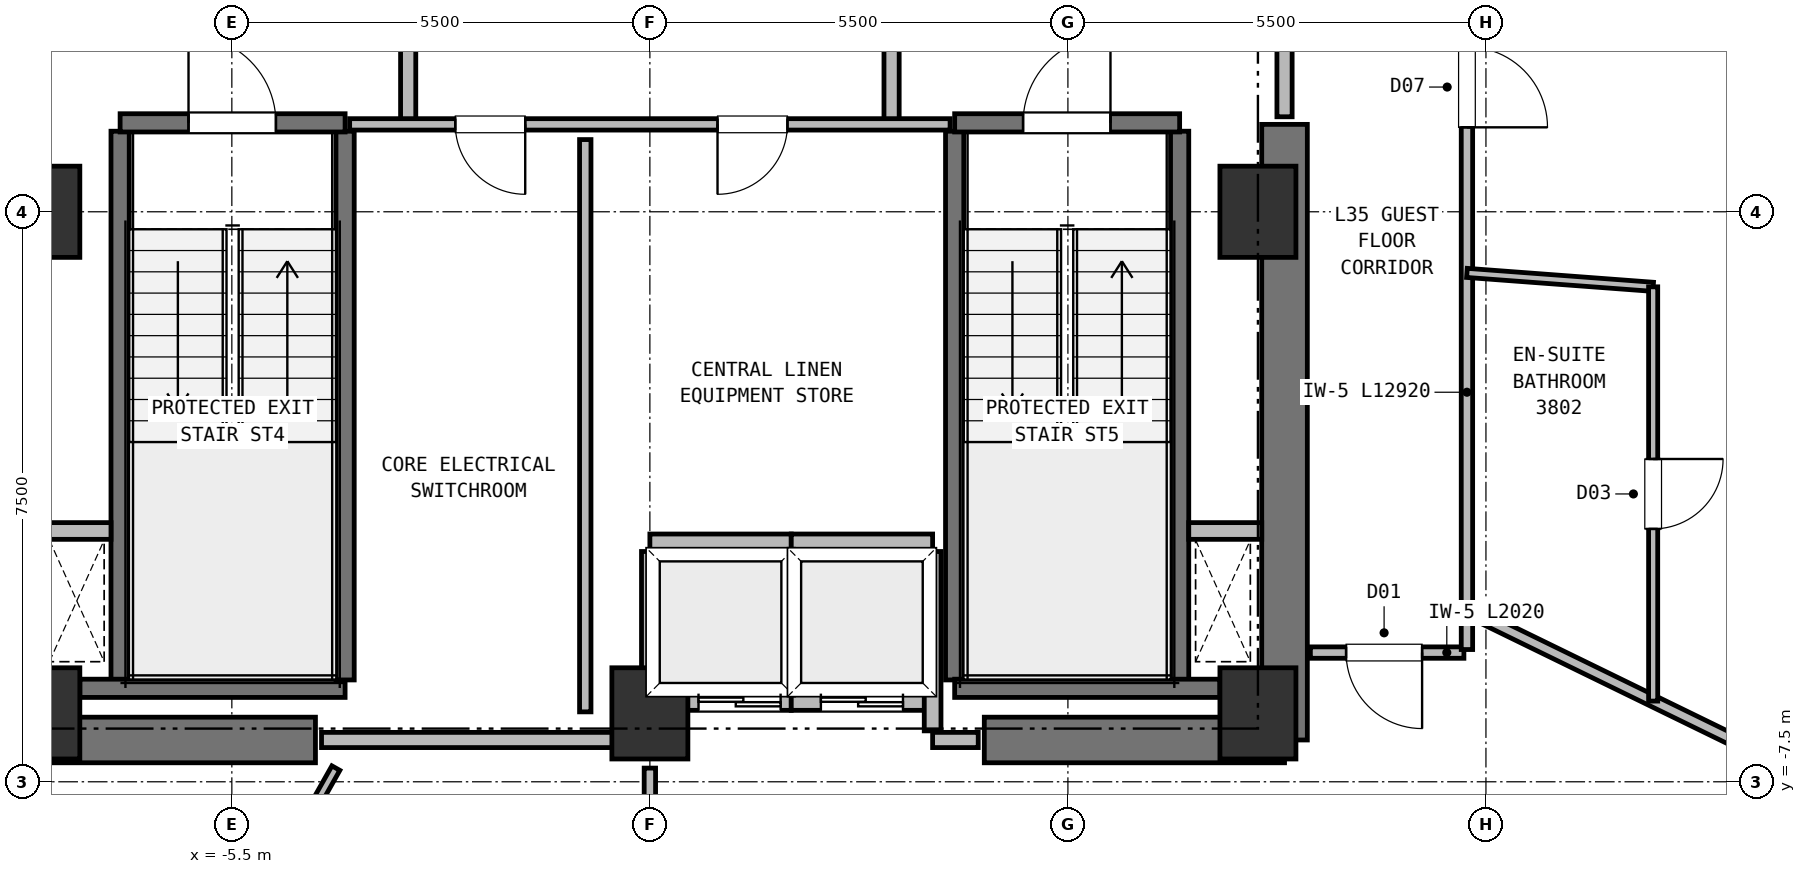
"""IFC4 building model, lengths in metres.
Left out: names, types, materials, properties, quantities, classifications, styles, units other than length and angle.
Written with IfcOpenShell. Run it as: python <this file> out.ifc"""

import sys

from ifc_helpers import new_model, si_unit, direction, frame, frame_2d, origin, origin_2d, place, context, subcontext, project, spatial, rectangle, extrude, element, fill, save


model = new_model("IFC4")
c1 = context("Model", 3, precision=1e-05, world=origin(), true_north=direction((0.0, 1.0)))
c2 = subcontext(c1, "Body", "Model", "MODEL_VIEW")
j1 = project(units=[si_unit("LENGTHUNIT", "METRE"), si_unit("PLANEANGLEUNIT", "RADIAN")], contexts=[c1])
p1 = place(None, origin())
s1 = spatial("IfcSite", under=j1, at=p1, CompositionType="ELEMENT")
p2 = place(p1, origin())
s2 = spatial("IfcBuilding", under=s1, at=p2, CompositionType="ELEMENT")
p3 = place(p2, frame((0.0, 0.0, 142.25)))
s3 = spatial("IfcBuildingStorey", under=s2, at=p3, CompositionType="ELEMENT", Elevation=142.25)
for number, where, z_axis, x_axis in (
    (1, (-8.0, -6.6, 0.0), (0.0, 0.0, 1.0), (1.0, 0.0, 0.0)),
    (2, (0.0, -6.6, 0.0), (0.0, 0.0, 1.0), (1.0, 0.0, 0.0)),
    (3, (8.0, -6.6, 0.0), (0.0, 0.0, 1.0), (1.0, 0.0, 0.0)),
    (4, (8.0, 0.0, 0.0), (0.0, 0.0, 1.0), (1.0, 0.0, 0.0)),
    (5, (-8.0, 0.0, 0.0), (0.0, 0.0, 1.0), (1.0, 0.0, 0.0)),
):
    element("IfcColumn", number, at=place(p3, frame(where, z_axis=z_axis, x_axis=x_axis)), inside=s3, PredefinedType="COLUMN", context=c2, shape_type="SweptSolid", body=[
        extrude(rectangle(XDim=1.0, YDim=1.2, at=origin_2d()), origin(), (0.0, 0.0, 1.0), 3.75),
    ])
for number, where, z_axis, x_axis in (
    (6, (-8.35, -6.95, 0.0), (0.0, 0.0, 1.0), (1.0, 0.0, 0.0)),
    (7, (4.4, -6.95, 0.0), (0.0, 0.0, 1.0), (1.0, 0.0, 0.0)),
):
    element("IfcWall", number, at=place(p3, frame(where, z_axis=z_axis, x_axis=x_axis)), inside=s3, PredefinedType="SHEAR", context=c2, shape_type="SweptSolid", body=[
        extrude(rectangle(XDim=3.95, YDim=0.6, at=frame_2d((1.975, 0.0))), origin(), (0.0, 0.0, 1.0), 3.5),
    ])
p4 = place(p3, frame((8.35, -6.95, 0.0), z_axis=(0.0, 0.0, 1.0), x_axis=(0.0, 1.0, 0.0)))
e8 = element("IfcWall", 8, at=p4, inside=s3, PredefinedType="SHEAR", context=c2, shape_type="SweptSolid", body=[
    extrude(rectangle(XDim=8.1, YDim=0.6, at=frame_2d((4.05, 0.0))), origin(), (0.0, 0.0, 1.0), 3.5),
])
p5 = place(p3, frame((14.747, -8.007, 0.0), z_axis=(0.0, 0.0, 1.0), x_axis=(0.852640164354, 0.522498564716, 0.0)))
e9 = element("IfcColumn", 9, at=p5, inside=s3, PredefinedType="COLUMN", context=c2, shape_type="SweptSolid", body=[
    extrude(rectangle(XDim=0.9, YDim=1.1, at=origin_2d()), origin(), (0.0, 0.0, 1.0), 3.75),
])
p6 = place(p3, frame((18.196, -6.407, 0.0), z_axis=(0.0, 0.0, 1.0), x_axis=(-0.727867791097, -0.685717491889, 0.0)))
e10 = element("IfcWall", 10, at=p6, inside=s3, PredefinedType="SOLIDWALL", context=c2, shape_type="SweptSolid", body=[
    extrude(rectangle(XDim=5.827, YDim=0.36, at=frame_2d((2.914, 0.0))), origin(), (0.0, 0.0, 1.0), 3.5),
])
p7 = place(p6, frame((2.66, 0.0, 0.72)))
e11 = element("IfcOpeningElement", 11, at=p7, cuts=e10, PredefinedType="OPENING", context=c2, shape_type="SweptSolid", body=[
    extrude(rectangle(XDim=1.6, YDim=1.88, at=frame_2d((0.8, 0.94))), frame((0.0, 0.19, 0.0), z_axis=(0.0, -1.0, 0.0), x_axis=(1.0, 0.0, 0.0)), (0.0, 0.0, 1.0), 0.38),
])
p8 = place(p3, frame((-6.97, -6.16, 0.0), z_axis=(0.0, 0.0, 1.0), x_axis=(0.0, 1.0, 0.0)))
e12 = element("IfcWall", 12, at=p8, inside=s3, PredefinedType="SHEAR", context=c2, shape_type="SweptSolid", body=[
    extrude(rectangle(XDim=7.22, YDim=0.24, at=frame_2d((3.61, 0.0))), origin(), (0.0, 0.0, 1.0), 3.5),
])
p9 = place(p3, frame((-7.5, -6.27, 0.0), z_axis=(0.0, 0.0, 1.0), x_axis=(1.0, 0.0, 0.0)))
e13 = element("IfcWall", 13, at=p9, inside=s3, PredefinedType="SHEAR", context=c2, shape_type="SweptSolid", body=[
    extrude(rectangle(XDim=3.49, YDim=0.24, at=frame_2d((1.745, 0.0))), origin(), (0.0, 0.0, 1.0), 3.5),
])
p10 = place(p3, frame((-4.01, -6.16, 0.0), z_axis=(0.0, 0.0, 1.0), x_axis=(0.0, 1.0, 0.0)))
e14 = element("IfcWall", 14, at=p10, inside=s3, PredefinedType="SHEAR", context=c2, shape_type="SweptSolid", body=[
    extrude(rectangle(XDim=7.22, YDim=0.24, at=frame_2d((3.61, 0.0))), origin(), (0.0, 0.0, 1.0), 3.5),
])
p11 = place(p3, frame((-6.97, 1.17, 0.0), z_axis=(0.0, 0.0, 1.0), x_axis=(1.0, 0.0, 0.0)))
e15 = element("IfcWall", 15, at=p11, inside=s3, PredefinedType="SHEAR", context=c2, shape_type="SweptSolid", body=[
    extrude(rectangle(XDim=2.96, YDim=0.24, at=frame_2d((1.48, 0.0))), origin(), (0.0, 0.0, 1.0), 3.5),
])
p12 = place(p11, frame((0.9, 0.0, 0.0)))
e16 = element("IfcOpeningElement", 16, at=p12, cuts=e15, PredefinedType="OPENING", context=c2, shape_type="SweptSolid", body=[
    extrude(rectangle(XDim=1.15, YDim=2.15, at=frame_2d((0.575, 1.075))), frame((0.0, 0.13, 0.0), z_axis=(0.0, -1.0, 0.0), x_axis=(1.0, 0.0, 0.0)), (0.0, 0.0, 1.0), 0.26),
])
for number, where, z_axis, x_axis in (
    (17, (4.01, -6.16, 0.0), (0.0, 0.0, 1.0), (0.0, 1.0, 0.0)),
    (18, (6.97, -6.16, 0.0), (0.0, 0.0, 1.0), (0.0, 1.0, 0.0)),
):
    element("IfcWall", number, at=place(p3, frame(where, z_axis=z_axis, x_axis=x_axis)), inside=s3, PredefinedType="SHEAR", context=c2, shape_type="SweptSolid", body=[
        extrude(rectangle(XDim=7.22, YDim=0.24, at=frame_2d((3.61, 0.0))), origin(), (0.0, 0.0, 1.0), 3.5),
    ])
p13 = place(p3, frame((4.01, -6.27, 0.0), z_axis=(0.0, 0.0, 1.0), x_axis=(1.0, 0.0, 0.0)))
e19 = element("IfcWall", 19, at=p13, inside=s3, PredefinedType="SHEAR", context=c2, shape_type="SweptSolid", body=[
    extrude(rectangle(XDim=3.49, YDim=0.24, at=frame_2d((1.745, 0.0))), origin(), (0.0, 0.0, 1.0), 3.5),
])
p14 = place(p3, frame((4.01, 1.17, 0.0), z_axis=(0.0, 0.0, 1.0), x_axis=(1.0, 0.0, 0.0)))
e20 = element("IfcWall", 20, at=p14, inside=s3, PredefinedType="SHEAR", context=c2, shape_type="SweptSolid", body=[
    extrude(rectangle(XDim=2.96, YDim=0.24, at=frame_2d((1.48, 0.0))), origin(), (0.0, 0.0, 1.0), 3.5),
])
p15 = place(p14, frame((0.9, 0.0, 0.0)))
e21 = element("IfcOpeningElement", 21, at=p15, cuts=e20, PredefinedType="OPENING", context=c2, shape_type="SweptSolid", body=[
    extrude(rectangle(XDim=1.15, YDim=2.15, at=frame_2d((0.575, 1.075))), frame((0.0, 0.13, 0.0), z_axis=(0.0, -1.0, 0.0), x_axis=(1.0, 0.0, 0.0)), (0.0, 0.0, 1.0), 0.26),
])
for number, where, z_axis, x_axis in (
    (22, (-8.05, -4.2, 0.0), (0.0, 0.0, 1.0), (1.0, 0.0, 0.0)),
    (23, (7.09, -4.2, 0.0), (0.0, 0.0, 1.0), (1.0, 0.0, 0.0)),
):
    element("IfcWall", number, at=place(p3, frame(where, z_axis=z_axis, x_axis=x_axis)), inside=s3, PredefinedType="PARTITIONING", context=c2, shape_type="SweptSolid", body=[
        extrude(rectangle(XDim=0.96, YDim=0.22, at=frame_2d((0.48, 0.0))), origin(), (0.0, 0.0, 1.0), 3.5),
    ])
p16 = place(p3, frame((0.0, -6.45, 0.0), z_axis=(0.0, 0.0, 1.0), x_axis=(1.0, 0.0, 0.0)))
e24 = element("IfcWall", 24, at=p16, inside=s3, PredefinedType="PARTITIONING", context=c2, shape_type="SweptSolid", body=[
    extrude(rectangle(XDim=1.86, YDim=0.22, at=frame_2d((0.93, 0.0))), origin(), (0.0, 0.0, 1.0), 3.12),
])
p17 = place(p16, frame((0.64, 0.0, 0.0)))
e25 = element("IfcOpeningElement", 25, at=p17, cuts=e24, PredefinedType="OPENING", context=c2, shape_type="SweptSolid", body=[
    extrude(rectangle(XDim=1.08, YDim=2.15, at=frame_2d((0.54, 1.075))), frame((0.0, 0.12, 0.0), z_axis=(0.0, -1.0, 0.0), x_axis=(1.0, 0.0, 0.0)), (0.0, 0.0, 1.0), 0.24),
])
for number, where, z_axis, x_axis in (
    (26, (0.0, -4.35, 0.0), (0.0, 0.0, 1.0), (1.0, 0.0, 0.0)),
    (27, (0.0, -6.33, 0.0), (0.0, 0.0, 1.0), (0.0, 1.0, 0.0)),
    (28, (1.86, -6.33, 0.0), (0.0, 0.0, 1.0), (0.0, 1.0, 0.0)),
):
    element("IfcWall", number, at=place(p3, frame(where, z_axis=z_axis, x_axis=x_axis)), inside=s3, PredefinedType="PARTITIONING", context=c2, shape_type="SweptSolid", body=[
        extrude(rectangle(XDim=1.86, YDim=0.22, at=frame_2d((0.93, 0.0))), origin(), (0.0, 0.0, 1.0), 3.5),
    ])
p18 = place(p3, frame((1.86, -6.45, 0.0), z_axis=(0.0, 0.0, 1.0), x_axis=(1.0, 0.0, 0.0)))
e29 = element("IfcWall", 29, at=p18, inside=s3, PredefinedType="PARTITIONING", context=c2, shape_type="SweptSolid", body=[
    extrude(rectangle(XDim=1.86, YDim=0.22, at=frame_2d((0.93, 0.0))), origin(), (0.0, 0.0, 1.0), 3.12),
])
p19 = place(p18, frame((0.39, 0.0, 0.0)))
e30 = element("IfcOpeningElement", 30, at=p19, cuts=e29, PredefinedType="OPENING", context=c2, shape_type="SweptSolid", body=[
    extrude(rectangle(XDim=1.08, YDim=2.15, at=frame_2d((0.54, 1.075))), frame((0.0, 0.12, 0.0), z_axis=(0.0, -1.0, 0.0), x_axis=(1.0, 0.0, 0.0)), (0.0, 0.0, 1.0), 0.24),
])
p20 = place(p3, frame((1.86, -4.35, 0.0), z_axis=(0.0, 0.0, 1.0), x_axis=(1.0, 0.0, 0.0)))
e31 = element("IfcWall", 31, at=p20, inside=s3, PredefinedType="PARTITIONING", context=c2, shape_type="SweptSolid", body=[
    extrude(rectangle(XDim=1.86, YDim=0.22, at=frame_2d((0.93, 0.0))), origin(), (0.0, 0.0, 1.0), 3.5),
])
p21 = place(p3, frame((3.72, -6.83, 0.0), z_axis=(0.0, 0.0, 1.0), x_axis=(0.0, 1.0, 0.0)))
e32 = element("IfcWall", 32, at=p21, inside=s3, PredefinedType="PARTITIONING", context=c2, shape_type="SweptSolid", body=[
    extrude(rectangle(XDim=2.36, YDim=0.22, at=frame_2d((1.18, 0.0))), origin(), (0.0, 0.0, 1.0), 3.5),
])
p22 = place(p3, frame((-3.18, 1.15, 0.0), z_axis=(0.0, 0.0, 1.0), x_axis=(0.0, 1.0, 0.0)))
e33 = element("IfcWall", 33, at=p22, inside=s3, PredefinedType="PARTITIONING", context=c2, shape_type="SweptSolid", body=[
    extrude(rectangle(XDim=3.3, YDim=0.2, at=frame_2d((1.65, 0.0))), origin(), (0.0, 0.0, 1.0), 3.5),
])
p23 = place(p22, frame((1.08, 0.0, 0.0)))
e34 = element("IfcOpeningElement", 34, at=p23, cuts=e33, PredefinedType="OPENING", context=c2, shape_type="SweptSolid", body=[
    extrude(rectangle(XDim=1.15, YDim=2.15, at=frame_2d((0.575, 1.075))), frame((0.0, 0.11, 0.0), z_axis=(0.0, -1.0, 0.0), x_axis=(1.0, 0.0, 0.0)), (0.0, 0.0, 1.0), 0.22),
])
p24 = place(p3, frame((3.18, 1.15, 0.0), z_axis=(0.0, 0.0, 1.0), x_axis=(0.0, 1.0, 0.0)))
e35 = element("IfcWall", 35, at=p24, inside=s3, PredefinedType="PARTITIONING", context=c2, shape_type="SweptSolid", body=[
    extrude(rectangle(XDim=3.3, YDim=0.2, at=frame_2d((1.65, 0.0))), origin(), (0.0, 0.0, 1.0), 3.5),
])
p25 = place(p24, frame((1.08, 0.0, 0.0)))
e36 = element("IfcOpeningElement", 36, at=p25, cuts=e35, PredefinedType="OPENING", context=c2, shape_type="SweptSolid", body=[
    extrude(rectangle(XDim=1.15, YDim=2.15, at=frame_2d((0.575, 1.075))), frame((0.0, 0.11, 0.0), z_axis=(0.0, -1.0, 0.0), x_axis=(1.0, 0.0, 0.0)), (0.0, 0.0, 1.0), 0.22),
])
p26 = place(p3, frame((8.35, 1.25, 0.0), z_axis=(0.0, 0.0, 1.0), x_axis=(0.0, 1.0, 0.0)))
e37 = element("IfcWall", 37, at=p26, inside=s3, PredefinedType="PARTITIONING", context=c2, shape_type="SweptSolid", body=[
    extrude(rectangle(XDim=5.3, YDim=0.2, at=frame_2d((2.65, 0.0))), origin(), (0.0, 0.0, 1.0), 3.5),
])
p27 = place(p26, frame((0.95, 0.0, 0.0)))
e38 = element("IfcOpeningElement", 38, at=p27, cuts=e37, PredefinedType="OPENING", context=c2, shape_type="SweptSolid", body=[
    extrude(rectangle(XDim=1.15, YDim=2.15, at=frame_2d((0.575, 1.075))), frame((0.0, 0.11, 0.0), z_axis=(0.0, -1.0, 0.0), x_axis=(1.0, 0.0, 0.0)), (0.0, 0.0, 1.0), 0.22),
])
p28 = place(p3, frame((3.95, 1.15, 0.0), z_axis=(0.0, 0.0, 1.0), x_axis=(-1.0, 0.0, 0.0)))
e39 = element("IfcWall", 39, at=p28, inside=s3, PredefinedType="PARTITIONING", context=c2, shape_type="SweptSolid", body=[
    extrude(rectangle(XDim=7.9, YDim=0.15, at=frame_2d((3.95, 0.0))), origin(), (0.0, 0.0, 1.0), 3.5),
])
p29 = place(p28, frame((5.59, 0.0, 0.0)))
e40 = element("IfcOpeningElement", 40, at=p29, cuts=e39, PredefinedType="OPENING", context=c2, shape_type="SweptSolid", body=[
    extrude(rectangle(XDim=0.92, YDim=2.05, at=frame_2d((0.46, 1.025))), frame((0.0, 0.085, 0.0), z_axis=(0.0, -1.0, 0.0), x_axis=(1.0, 0.0, 0.0)), (0.0, 0.0, 1.0), 0.17),
])
p30 = place(p28, frame((2.14, 0.0, 0.0)))
e41 = element("IfcOpeningElement", 41, at=p30, cuts=e39, PredefinedType="OPENING", context=c2, shape_type="SweptSolid", body=[
    extrude(rectangle(XDim=0.92, YDim=2.05, at=frame_2d((0.46, 1.025))), frame((0.0, 0.085, 0.0), z_axis=(0.0, -1.0, 0.0), x_axis=(1.0, 0.0, 0.0)), (0.0, 0.0, 1.0), 0.17),
])
p31 = place(p3, frame((-4.32, -6.95, 0.0), z_axis=(0.0, 0.0, 1.0), x_axis=(1.0, 0.0, 0.0)))
e42 = element("IfcWall", 42, at=p31, inside=s3, PredefinedType="PARTITIONING", context=c2, shape_type="SweptSolid", body=[
    extrude(rectangle(XDim=4.32, YDim=0.2, at=frame_2d((2.16, 0.0))), origin(), (0.0, 0.0, 1.0), 3.5),
])
p32 = place(p3, frame((3.72, -6.95, 0.0), z_axis=(0.0, 0.0, 1.0), x_axis=(1.0, 0.0, 0.0)))
e43 = element("IfcWall", 43, at=p32, inside=s3, PredefinedType="PARTITIONING", context=c2, shape_type="SweptSolid", body=[
    extrude(rectangle(XDim=0.6, YDim=0.2, at=frame_2d((0.3, 0.0))), origin(), (0.0, 0.0, 1.0), 3.5),
])
p33 = place(p3, frame((-0.85, -6.58, 0.0), z_axis=(0.0, 0.0, 1.0), x_axis=(0.0, 1.0, 0.0)))
e44 = element("IfcWall", 44, at=p33, inside=s3, PredefinedType="PARTITIONING", context=c2, shape_type="SweptSolid", body=[
    extrude(rectangle(XDim=7.53, YDim=0.15, at=frame_2d((3.765, 0.0))), origin(), (0.0, 0.0, 1.0), 3.5),
])
p34 = place(p3, frame((10.71, -5.8, 0.0), z_axis=(0.0, 0.0, 1.0), x_axis=(-1.0, 0.0, 0.0)))
e45 = element("IfcWall", 45, at=p34, inside=s3, PredefinedType="PARTITIONING", context=c2, shape_type="SweptSolid", body=[
    extrude(rectangle(XDim=2.02, YDim=0.15, at=frame_2d((1.01, 0.0))), origin(), (0.0, 0.0, 1.0), 3.5),
])
p35 = place(p34, frame((0.55, 0.0, 0.0)))
e46 = element("IfcOpeningElement", 46, at=p35, cuts=e45, PredefinedType="OPENING", context=c2, shape_type="SweptSolid", body=[
    extrude(rectangle(XDim=1.0, YDim=2.15, at=frame_2d((0.5, 1.075))), frame((0.0, 0.085, 0.0), z_axis=(0.0, -1.0, 0.0), x_axis=(1.0, 0.0, 0.0)), (0.0, 0.0, 1.0), 0.17),
])
p36 = place(p3, frame((10.75, 7.16, 0.0), z_axis=(0.0, 0.0, 1.0), x_axis=(0.0, -1.0, 0.0)))
e47 = element("IfcWall", 47, at=p36, inside=s3, PredefinedType="PARTITIONING", context=c2, shape_type="SweptSolid", body=[
    extrude(rectangle(XDim=12.92, YDim=0.15, at=frame_2d((6.46, 0.0))), origin(), (0.0, 0.0, 1.0), 3.5),
])
p37 = place(p36, frame((1.133, 0.0, 0.0)))
e48 = element("IfcOpeningElement", 48, at=p37, cuts=e47, PredefinedType="OPENING", context=c2, shape_type="SweptSolid", body=[
    extrude(rectangle(XDim=1.0, YDim=2.15, at=frame_2d((0.5, 1.075))), frame((0.0, 0.085, 0.0), z_axis=(0.0, -1.0, 0.0), x_axis=(1.0, 0.0, 0.0)), (0.0, 0.0, 1.0), 0.17),
])
p38 = place(p36, frame((4.989, 0.0, 0.0)))
e49 = element("IfcOpeningElement", 49, at=p38, cuts=e47, PredefinedType="OPENING", context=c2, shape_type="SweptSolid", body=[
    extrude(rectangle(XDim=1.06, YDim=2.15, at=frame_2d((0.53, 1.075))), frame((0.0, 0.085, 0.0), z_axis=(0.0, -1.0, 0.0), x_axis=(1.0, 0.0, 0.0)), (0.0, 0.0, 1.0), 0.17),
])
p39 = place(p3, frame((-4.131, -7.32, 0.0), z_axis=(0.0, 0.0, 1.0), x_axis=(-0.491533175525, -0.870858850422, 0.0)))
e50 = element("IfcWall", 50, at=p39, inside=s3, PredefinedType="PARTITIONING", context=c2, shape_type="SweptSolid", body=[
    extrude(rectangle(XDim=2.733, YDim=0.12, at=frame_2d((1.366, 0.0))), origin(), (0.0, 0.0, 1.0), 3.5),
])
p40 = place(p3, frame((0.0, -7.32, 0.0), z_axis=(0.0, 0.0, 1.0), x_axis=(0.0, -1.0, 0.0)))
e51 = element("IfcWall", 51, at=p40, inside=s3, PredefinedType="PARTITIONING", context=c2, shape_type="SweptSolid", body=[
    extrude(rectangle(XDim=12.184, YDim=0.15, at=frame_2d((6.092, 0.0))), origin(), (0.0, 0.0, 1.0), 3.5),
])
p41 = place(p3, frame((10.75, -5.243, 0.0), z_axis=(0.0, 0.0, 1.0), x_axis=(0.898794987621, -0.438369216787, 0.0)))
e52 = element("IfcWall", 52, at=p41, inside=s3, PredefinedType="PARTITIONING", context=c2, shape_type="SweptSolid", body=[
    extrude(rectangle(XDim=6.365, YDim=0.15, at=frame_2d((3.182, 0.0))), origin(), (0.0, 0.0, 1.0), 3.5),
])
p42 = place(p3, frame((10.75, -0.804, 0.0), z_axis=(0.0, 0.0, 1.0), x_axis=(0.99721134034, -0.074629368868, 0.0)))
e53 = element("IfcWall", 53, at=p42, inside=s3, PredefinedType="PARTITIONING", context=c2, shape_type="SweptSolid", body=[
    extrude(rectangle(XDim=2.457, YDim=0.12, at=frame_2d((1.229, 0.0))), origin(), (0.0, 0.0, 1.0), 3.5),
])
p43 = place(p3, frame((13.2, -0.988, 0.0), z_axis=(0.0, 0.0, 1.0), x_axis=(0.0, -1.0, 0.0)))
e54 = element("IfcWall", 54, at=p43, inside=s3, PredefinedType="PARTITIONING", context=c2, shape_type="SweptSolid", body=[
    extrude(rectangle(XDim=5.45, YDim=0.12, at=frame_2d((2.725, 0.0))), origin(), (0.0, 0.0, 1.0), 3.5),
])
p44 = place(p43, frame((2.265, 0.0, 0.0)))
e55 = element("IfcOpeningElement", 55, at=p44, cuts=e54, PredefinedType="OPENING", context=c2, shape_type="SweptSolid", body=[
    extrude(rectangle(XDim=0.92, YDim=2.1, at=frame_2d((0.46, 1.05))), frame((0.0, 0.07, 0.0), z_axis=(0.0, -1.0, 0.0), x_axis=(1.0, 0.0, 0.0)), (0.0, 0.0, 1.0), 0.14),
])
p45 = place(p12, origin())
e56 = element("IfcDoor", 56, at=p45, inside=s3, OperationType="SINGLE_SWING_LEFT", PredefinedType="DOOR", context=c2, shape_type="SweptSolid", body=[
    extrude(rectangle(XDim=1.15, YDim=2.15, at=frame_2d((0.575, 1.075))), frame((0.0, 0.025, 0.0), z_axis=(0.0, -1.0, 0.0), x_axis=(1.0, 0.0, 0.0)), (0.0, 0.0, 1.0), 0.05),
])
fill(e16, e56)
p46 = place(p15, origin())
e57 = element("IfcDoor", 57, at=p46, inside=s3, OperationType="SINGLE_SWING_RIGHT", PredefinedType="DOOR", context=c2, shape_type="SweptSolid", body=[
    extrude(rectangle(XDim=1.15, YDim=2.15, at=frame_2d((0.575, 1.075))), frame((0.0, 0.025, 0.0), z_axis=(0.0, -1.0, 0.0), x_axis=(1.0, 0.0, 0.0)), (0.0, 0.0, 1.0), 0.05),
])
fill(e21, e57)
p47 = place(p17, origin())
e58 = element("IfcDoor", 58, at=p47, inside=s3, OperationType="DOUBLE_DOOR_SLIDING", PredefinedType="DOOR", context=c2, shape_type="SweptSolid", body=[
    extrude(rectangle(XDim=1.08, YDim=2.15, at=frame_2d((0.54, 1.075))), frame((0.0, 0.025, 0.0), z_axis=(0.0, -1.0, 0.0), x_axis=(1.0, 0.0, 0.0)), (0.0, 0.0, 1.0), 0.05),
])
fill(e25, e58)
p48 = place(p19, origin())
e59 = element("IfcDoor", 59, at=p48, inside=s3, OperationType="DOUBLE_DOOR_SLIDING", PredefinedType="DOOR", context=c2, shape_type="SweptSolid", body=[
    extrude(rectangle(XDim=1.08, YDim=2.15, at=frame_2d((0.54, 1.075))), frame((0.0, 0.025, 0.0), z_axis=(0.0, -1.0, 0.0), x_axis=(1.0, 0.0, 0.0)), (0.0, 0.0, 1.0), 0.05),
])
fill(e30, e59)
p49 = place(p29, origin())
e60 = element("IfcDoor", 60, at=p49, inside=s3, OperationType="SINGLE_SWING_LEFT", PredefinedType="DOOR", context=c2, shape_type="SweptSolid", body=[
    extrude(rectangle(XDim=0.92, YDim=2.05, at=frame_2d((0.46, 1.025))), frame((0.0, 0.025, 0.0), z_axis=(0.0, -1.0, 0.0), x_axis=(1.0, 0.0, 0.0)), (0.0, 0.0, 1.0), 0.05),
])
fill(e40, e60)
p50 = place(p30, origin())
e61 = element("IfcDoor", 61, at=p50, inside=s3, OperationType="SINGLE_SWING_RIGHT", PredefinedType="DOOR", context=c2, shape_type="SweptSolid", body=[
    extrude(rectangle(XDim=0.92, YDim=2.05, at=frame_2d((0.46, 1.025))), frame((0.0, 0.025, 0.0), z_axis=(0.0, -1.0, 0.0), x_axis=(1.0, 0.0, 0.0)), (0.0, 0.0, 1.0), 0.05),
])
fill(e41, e61)
p51 = place(p44, origin())
e62 = element("IfcDoor", 62, at=p51, inside=s3, OperationType="SINGLE_SWING_LEFT", PredefinedType="DOOR", context=c2, shape_type="SweptSolid", body=[
    extrude(rectangle(XDim=0.92, YDim=2.1, at=frame_2d((0.46, 1.05))), frame((0.0, 0.025, 0.0), z_axis=(0.0, -1.0, 0.0), x_axis=(1.0, 0.0, 0.0)), (0.0, 0.0, 1.0), 0.05),
])
fill(e55, e62)
p52 = place(p35, origin())
e63 = element("IfcDoor", 63, at=p52, inside=s3, OperationType="SINGLE_SWING_LEFT", PredefinedType="DOOR", context=c2, shape_type="SweptSolid", body=[
    extrude(rectangle(XDim=1.0, YDim=2.15, at=frame_2d((0.5, 1.075))), frame((0.0, 0.025, 0.0), z_axis=(0.0, -1.0, 0.0), x_axis=(1.0, 0.0, 0.0)), (0.0, 0.0, 1.0), 0.05),
])
fill(e46, e63)
p53 = place(p38, origin())
e64 = element("IfcDoor", 64, at=p53, inside=s3, OperationType="SINGLE_SWING_RIGHT", PredefinedType="DOOR", context=c2, shape_type="SweptSolid", body=[
    extrude(rectangle(XDim=1.06, YDim=2.15, at=frame_2d((0.53, 1.075))), frame((0.0, 0.025, 0.0), z_axis=(0.0, -1.0, 0.0), x_axis=(1.0, 0.0, 0.0)), (0.0, 0.0, 1.0), 0.05),
])
fill(e49, e64)
save(model, sys.argv[1])
